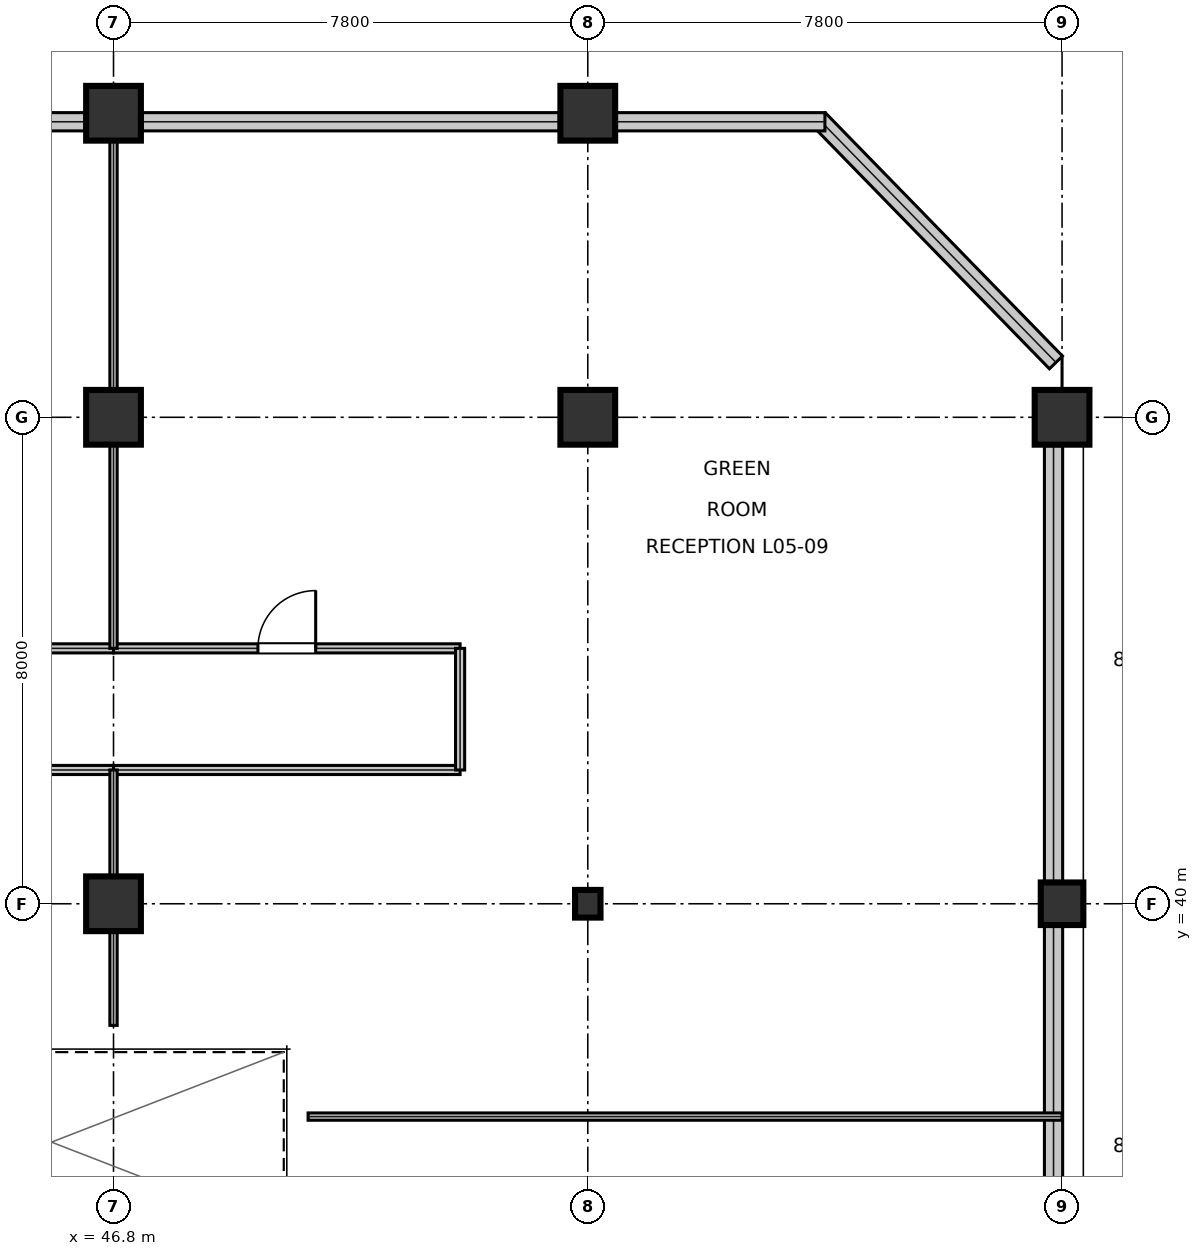
"""IFC4 building model, lengths in metres.
Left out: names, types, materials, properties, quantities, classifications, styles, units other than length and angle.
Written with IfcOpenShell. Run it as: python <this file> out.ifc"""

import sys

from ifc_helpers import new_model, si_unit, direction, frame, frame_2d, origin, origin_2d, place, context, subcontext, project, spatial, rectangle, i_section, extrude, element, fill, save


model = new_model("IFC4")
c1 = context("Model", 3, precision=1e-05, world=origin(), true_north=direction((0.0, 1.0)))
c2 = subcontext(c1, "Body", "Model", "MODEL_VIEW")
j1 = project(units=[si_unit("LENGTHUNIT", "METRE"), si_unit("PLANEANGLEUNIT", "RADIAN")], contexts=[c1])
p1 = place(None, origin())
s1 = spatial("IfcSite", under=j1, at=p1, CompositionType="ELEMENT")
p2 = place(p1, origin())
s2 = spatial("IfcBuilding", under=s1, at=p2, CompositionType="ELEMENT")
p3 = place(p2, frame((0.0, 0.0, 27.0)))
s3 = spatial("IfcBuildingStorey", under=s2, at=p3, CompositionType="ELEMENT", Elevation=27.0)
for number, where, z_axis, x_axis in (
    (1, (46.8, 40.0, 0.0), (0.0, 0.0, 1.0), (1.0, 0.0, 0.0)),
    (2, (46.8, 48.0, 0.0), (0.0, 0.0, 1.0), (1.0, 0.0, 0.0)),
    (3, (46.8, 53.0, 0.0), (0.0, 0.0, 1.0), (1.0, 0.0, 0.0)),
):
    element("IfcColumn", number, at=place(p3, frame(where, z_axis=z_axis, x_axis=x_axis)), inside=s3, PredefinedType="COLUMN", context=c2, shape_type="SweptSolid", body=[
        extrude(rectangle(XDim=0.9, YDim=0.9, at=origin_2d()), origin(), (0.0, 0.0, 1.0), 5.395),
    ])
p4 = place(p3, frame((54.6, 40.0, 0.0), z_axis=(0.0, 0.0, 1.0), x_axis=(1.0, 0.0, 0.0)))
e4 = element("IfcColumn", 4, at=p4, inside=s3, PredefinedType="COLUMN", context=c2, shape_type="SweptSolid", body=[
    extrude(i_section(OverallWidth=0.418, OverallDepth=0.455, WebThickness=0.042, FlangeThickness=0.068, at=origin_2d()), origin(), (0.0, 0.0, 1.0), 5.395),
])
for number, where, z_axis, x_axis in (
    (5, (54.6, 48.0, 0.0), (0.0, 0.0, 1.0), (1.0, 0.0, 0.0)),
    (6, (54.6, 53.0, 0.0), (0.0, 0.0, 1.0), (1.0, 0.0, 0.0)),
):
    element("IfcColumn", number, at=place(p3, frame(where, z_axis=z_axis, x_axis=x_axis)), inside=s3, PredefinedType="COLUMN", context=c2, shape_type="SweptSolid", body=[
        extrude(rectangle(XDim=0.9, YDim=0.9, at=origin_2d()), origin(), (0.0, 0.0, 1.0), 5.395),
    ])
p5 = place(p3, frame((62.4, 40.0, 0.0), z_axis=(0.0, 0.0, 1.0), x_axis=(1.0, 0.0, 0.0)))
e7 = element("IfcColumn", 7, at=p5, inside=s3, PredefinedType="PILASTER", context=c2, shape_type="SweptSolid", body=[
    extrude(rectangle(XDim=0.7, YDim=0.7, at=origin_2d()), origin(), (0.0, 0.0, 1.0), 5.395),
])
p6 = place(p3, frame((62.4, 48.0, 0.0), z_axis=(0.0, 0.0, 1.0), x_axis=(1.0, 0.0, 0.0)))
e8 = element("IfcColumn", 8, at=p6, inside=s3, PredefinedType="COLUMN", context=c2, shape_type="SweptSolid", body=[
    extrude(rectangle(XDim=0.9, YDim=0.9, at=origin_2d()), origin(), (0.0, 0.0, 1.0), 5.395),
])
for number, where, z_axis, x_axis in (
    (9, (62.26, 32.468, 0.0), (0.0, 0.0, 1.0), (0.0, 1.0, 0.0)),
    (10, (62.26, 40.368, 0.0), (0.0, 0.0, 1.0), (0.0, 1.0, 0.0)),
):
    element("IfcWall", number, at=place(p3, frame(where, z_axis=z_axis, x_axis=x_axis)), inside=s3, PredefinedType="STANDARD", context=c2, shape_type="SweptSolid", body=[
        extrude(rectangle(XDim=7.164, YDim=0.3, at=frame_2d((3.582, 0.0))), origin(), (0.0, 0.0, 1.0), 4.608),
    ])
p7 = place(p3, frame((62.3, 48.902, 0.0), z_axis=(0.0, 0.0, 1.0), x_axis=(-0.698091174493, 0.716008877106, 0.0)))
e11 = element("IfcWall", 11, at=p7, inside=s3, PredefinedType="STANDARD", context=c2, shape_type="SweptSolid", body=[
    extrude(rectangle(XDim=5.586, YDim=0.3, at=frame_2d((2.793, 0.0))), origin(), (0.0, 0.0, 1.0), 5.08),
])
p8 = place(p3, frame((58.5, 52.86, 0.0), z_axis=(0.0, 0.0, 1.0), x_axis=(-1.0, 0.0, 0.0)))
e12 = element("IfcWall", 12, at=p8, inside=s3, PredefinedType="STANDARD", context=c2, shape_type="SweptSolid", body=[
    extrude(rectangle(XDim=3.432, YDim=0.3, at=frame_2d((1.716, 0.0))), origin(), (0.0, 0.0, 1.0), 5.08),
])
for number, where, z_axis, x_axis in (
    (13, (54.132, 52.86, 0.0), (0.0, 0.0, 1.0), (-1.0, 0.0, 0.0)),
    (14, (46.332, 52.86, 0.0), (0.0, 0.0, 1.0), (-1.0, 0.0, 0.0)),
):
    element("IfcWall", number, at=place(p3, frame(where, z_axis=z_axis, x_axis=x_axis)), inside=s3, PredefinedType="STANDARD", context=c2, shape_type="SweptSolid", body=[
        extrude(rectangle(XDim=6.864, YDim=0.3, at=frame_2d((3.432, 0.0))), origin(), (0.0, 0.0, 1.0), 4.608),
    ])
p9 = place(p3, frame((37.0, 42.2, 0.0), z_axis=(0.0, 0.0, 1.0), x_axis=(1.0, 0.0, 0.0)))
e15 = element("IfcWall", 15, at=p9, inside=s3, PredefinedType="PARTITIONING", context=c2, shape_type="SweptSolid", body=[
    extrude(rectangle(XDim=9.8, YDim=0.15, at=frame_2d((4.9, 0.0))), origin(), (0.0, 0.0, 1.0), 4.375),
])
p10 = place(p9, frame((4.425, 0.0, 0.0)))
e16 = element("IfcOpeningElement", 16, at=p10, cuts=e15, PredefinedType="OPENING", context=c2, shape_type="SweptSolid", body=[
    extrude(rectangle(XDim=0.95, YDim=2.15, at=frame_2d((0.475, 1.075))), frame((0.0, 0.085, 0.0), z_axis=(0.0, -1.0, 0.0), x_axis=(1.0, 0.0, 0.0)), (0.0, 0.0, 1.0), 0.17),
])
p11 = place(p3, frame((46.8, 44.2, 0.0), z_axis=(0.0, 0.0, 1.0), x_axis=(1.0, 0.0, 0.0)))
e17 = element("IfcWall", 17, at=p11, inside=s3, PredefinedType="PARTITIONING", context=c2, shape_type="SweptSolid", body=[
    extrude(rectangle(XDim=5.7, YDim=0.15, at=frame_2d((2.85, 0.0))), origin(), (0.0, 0.0, 1.0), 4.375),
])
p12 = place(p11, frame((2.375, 0.0, 0.0)))
e18 = element("IfcOpeningElement", 18, at=p12, cuts=e17, PredefinedType="OPENING", context=c2, shape_type="SweptSolid", body=[
    extrude(rectangle(XDim=0.95, YDim=2.15, at=frame_2d((0.475, 1.075))), frame((0.0, 0.085, 0.0), z_axis=(0.0, -1.0, 0.0), x_axis=(1.0, 0.0, 0.0)), (0.0, 0.0, 1.0), 0.17),
])
p13 = place(p3, frame((37.0, 44.2, 0.0), z_axis=(0.0, 0.0, 1.0), x_axis=(1.0, 0.0, 0.0)))
e19 = element("IfcWall", 19, at=p13, inside=s3, PredefinedType="PARTITIONING", context=c2, shape_type="SweptSolid", body=[
    extrude(rectangle(XDim=9.8, YDim=0.15, at=frame_2d((4.9, 0.0))), origin(), (0.0, 0.0, 1.0), 4.375),
])
p14 = place(p13, frame((4.425, 0.0, 0.0)))
e20 = element("IfcOpeningElement", 20, at=p14, cuts=e19, PredefinedType="OPENING", context=c2, shape_type="SweptSolid", body=[
    extrude(rectangle(XDim=0.95, YDim=2.15, at=frame_2d((0.475, 1.075))), frame((0.0, 0.085, 0.0), z_axis=(0.0, -1.0, 0.0), x_axis=(1.0, 0.0, 0.0)), (0.0, 0.0, 1.0), 0.17),
])
p15 = place(p3, frame((46.8, 42.2, 0.0), z_axis=(0.0, 0.0, 1.0), x_axis=(1.0, 0.0, 0.0)))
e21 = element("IfcWall", 21, at=p15, inside=s3, PredefinedType="PARTITIONING", context=c2, shape_type="SweptSolid", body=[
    extrude(rectangle(XDim=5.7, YDim=0.15, at=frame_2d((2.85, 0.0))), origin(), (0.0, 0.0, 1.0), 4.375),
])
p16 = place(p3, frame((52.5, 42.2, 0.0), z_axis=(0.0, 0.0, 1.0), x_axis=(0.0, 1.0, 0.0)))
e22 = element("IfcWall", 22, at=p16, inside=s3, PredefinedType="PARTITIONING", context=c2, shape_type="SweptSolid", body=[
    extrude(rectangle(XDim=2.0, YDim=0.15, at=frame_2d((1.0, 0.0))), origin(), (0.0, 0.0, 1.0), 4.661),
])
p17 = place(p3, frame((50.0, 36.5, 0.0), z_axis=(0.0, 0.0, 1.0), x_axis=(1.0, 0.0, 0.0)))
e23 = element("IfcWall", 23, at=p17, inside=s3, PredefinedType="PARTITIONING", context=c2, shape_type="SweptSolid", body=[
    extrude(rectangle(XDim=12.4, YDim=0.12, at=frame_2d((6.2, 0.0))), origin(), (0.0, 0.0, 1.0), 4.375),
])
p18 = place(p3, frame((46.8, 38.0, 0.0), z_axis=(0.0, 0.0, 1.0), x_axis=(0.0, 1.0, 0.0)))
e24 = element("IfcWall", 24, at=p18, inside=s3, PredefinedType="PARTITIONING", context=c2, shape_type="SweptSolid", body=[
    extrude(rectangle(XDim=4.2, YDim=0.12, at=frame_2d((2.1, 0.0))), origin(), (0.0, 0.0, 1.0), 4.298),
])
p19 = place(p3, frame((46.8, 44.2, 0.0), z_axis=(0.0, 0.0, 1.0), x_axis=(0.0, 1.0, 0.0)))
e25 = element("IfcWall", 25, at=p19, inside=s3, PredefinedType="PARTITIONING", context=c2, shape_type="SweptSolid", body=[
    extrude(rectangle(XDim=8.8, YDim=0.12, at=frame_2d((4.4, 0.0))), origin(), (0.0, 0.0, 1.0), 4.298),
])
p20 = place(p12, origin())
e26 = element("IfcDoor", 26, at=p20, inside=s3, OperationType="SINGLE_SWING_RIGHT", PredefinedType="DOOR", context=c2, shape_type="SweptSolid", body=[
    extrude(rectangle(XDim=0.95, YDim=2.15, at=frame_2d((0.475, 1.075))), frame((0.0, 0.025, 0.0), z_axis=(0.0, -1.0, 0.0), x_axis=(1.0, 0.0, 0.0)), (0.0, 0.0, 1.0), 0.05),
])
fill(e18, e26)
save(model, sys.argv[1])
